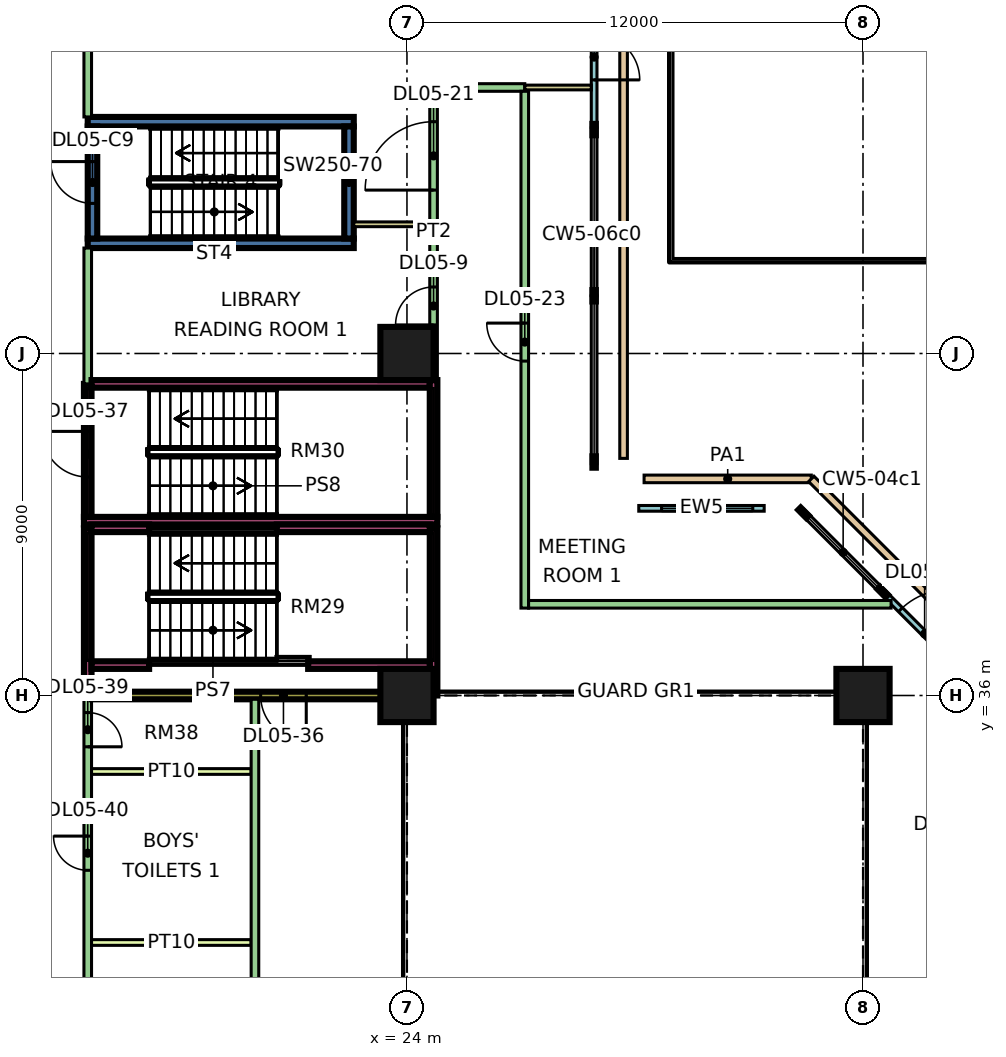
"""IFC4 building model, lengths in metres.
Left out: names, types, materials, properties, quantities, classifications, styles, units other than length and angle.
Written with IfcOpenShell. Run it as: python <this file> out.ifc"""

import sys

from ifc_helpers import new_model, si_unit, direction, frame, frame_2d, origin, origin_2d, place, context, subcontext, project, spatial, rectangle, extrude, element, fill, save


model = new_model("IFC4")
c1 = context("Model", 3, precision=1e-05, world=origin(), true_north=direction((0.0, 1.0)))
c2 = subcontext(c1, "Body", "Model", "MODEL_VIEW")
j1 = project(units=[si_unit("LENGTHUNIT", "METRE"), si_unit("PLANEANGLEUNIT", "RADIAN")], contexts=[c1])
p1 = place(None, origin())
s1 = spatial("IfcSite", under=j1, at=p1, CompositionType="ELEMENT")
p2 = place(p1, origin())
s2 = spatial("IfcBuilding", under=s1, at=p2, CompositionType="ELEMENT")
p3 = place(p2, frame((0.0, 0.0, 26.4)))
s3 = spatial("IfcBuildingStorey", under=s2, at=p3, CompositionType="ELEMENT", Elevation=26.4)
for number, where, z_axis, x_axis in (
    (1, (24.0, 36.0, 0.0), (0.0, 0.0, 1.0), (1.0, 0.0, 0.0)),
    (2, (36.0, 36.0, 0.0), (0.0, 0.0, 1.0), (1.0, 0.0, 0.0)),
    (3, (24.0, 45.0, 0.0), (0.0, 0.0, 1.0), (1.0, 0.0, 0.0)),
):
    element("IfcColumn", number, at=place(p3, frame(where, z_axis=z_axis, x_axis=x_axis)), inside=s3, PredefinedType="COLUMN", context=c2, shape_type="SweptSolid", body=[
        extrude(rectangle(XDim=1.4, YDim=1.4, at=origin_2d()), origin(), (0.0, 0.0, 1.0), 9.0),
    ])
for number, where, z_axis, x_axis in (
    (4, (15.6, 47.9, 0.0), (0.0, 0.0, 1.0), (1.0, 0.0, 0.0)),
    (5, (15.6, 51.1, 0.0), (0.0, 0.0, 1.0), (1.0, 0.0, 0.0)),
):
    element("IfcWall", number, at=place(p3, frame(where, z_axis=z_axis, x_axis=x_axis)), inside=s3, PredefinedType="SHEAR", context=c2, shape_type="SweptSolid", body=[
        extrude(rectangle(XDim=7.0, YDim=0.25, at=frame_2d((3.5, 0.0))), origin(), (0.0, 0.0, 1.0), 9.0),
    ])
p4 = place(p3, frame((15.725, 48.025, 0.0), z_axis=(0.0, 0.0, 1.0), x_axis=(0.0, 1.0, 0.0)))
e6 = element("IfcWall", 6, at=p4, inside=s3, PredefinedType="SHEAR", context=c2, shape_type="SweptSolid", body=[
    extrude(rectangle(XDim=2.95, YDim=0.25, at=frame_2d((1.475, 0.0))), origin(), (0.0, 0.0, 1.0), 9.0),
])
p5 = place(p4, frame((0.925, 0.0, 0.0)))
e7 = element("IfcOpeningElement", 7, at=p5, cuts=e6, PredefinedType="OPENING", context=c2, shape_type="SweptSolid", body=[
    extrude(rectangle(XDim=1.1, YDim=2.2, at=frame_2d((0.55, 1.1))), frame((0.0, 0.135, 0.0), z_axis=(0.0, -1.0, 0.0), x_axis=(1.0, 0.0, 0.0)), (0.0, 0.0, 1.0), 0.27),
])
p6 = place(p3, frame((22.475, 48.025, 0.0), z_axis=(0.0, 0.0, 1.0), x_axis=(0.0, 1.0, 0.0)))
e8 = element("IfcWall", 8, at=p6, inside=s3, PredefinedType="SHEAR", context=c2, shape_type="SweptSolid", body=[
    extrude(rectangle(XDim=2.95, YDim=0.25, at=frame_2d((1.475, 0.0))), origin(), (0.0, 0.0, 1.0), 9.0),
])
p7 = place(p3, frame((38.682, 36.561, 0.0), z_axis=(0.0, 0.0, 1.0), x_axis=(-0.707106781187, 0.707106781187, 0.0)))
e9 = element("IfcWall", 9, at=p7, inside=s3, PredefinedType="SOLIDWALL", context=c2, shape_type="SweptSolid", body=[
    extrude(rectangle(XDim=3.0, YDim=0.15, at=frame_2d((1.5, 0.0))), origin(), (0.0, 0.0, 1.0), 8.45),
])
p8 = place(p7, frame((0.6, 0.0, 0.0)))
e10 = element("IfcOpeningElement", 10, at=p8, cuts=e9, PredefinedType="OPENING", context=c2, shape_type="SweptSolid", body=[
    extrude(rectangle(XDim=1.8, YDim=2.4, at=frame_2d((0.9, 1.2))), frame((0.0, 0.085, 0.0), z_axis=(0.0, -1.0, 0.0), x_axis=(1.0, 0.0, 0.0)), (0.0, 0.0, 1.0), 0.17),
])
p9 = place(p3, frame((33.4, 40.925, 0.0), z_axis=(0.0, 0.0, 1.0), x_axis=(-1.0, 0.0, 0.0)))
e11 = element("IfcWall", 11, at=p9, inside=s3, PredefinedType="SOLIDWALL", context=c2, shape_type="SweptSolid", body=[
    extrude(rectangle(XDim=3.3, YDim=0.15, at=frame_2d((1.65, 0.0))), origin(), (0.0, 0.0, 1.0), 8.45),
])
p10 = place(p9, frame((0.3, 0.0, 0.9)))
e12 = element("IfcOpeningElement", 12, at=p10, cuts=e11, PredefinedType="OPENING", context=c2, shape_type="SweptSolid", body=[
    extrude(rectangle(XDim=2.4, YDim=2.7, at=frame_2d((1.2, 1.35))), frame((0.0, 0.085, 0.0), z_axis=(0.0, -1.0, 0.0), x_axis=(1.0, 0.0, 0.0)), (0.0, 0.0, 1.0), 0.17),
])
p11 = place(p3, frame((28.925, 50.95, 0.0), z_axis=(0.0, 0.0, 1.0), x_axis=(0.0, 1.0, 0.0)))
e13 = element("IfcWall", 13, at=p11, inside=s3, PredefinedType="SOLIDWALL", context=c2, shape_type="SweptSolid", body=[
    extrude(rectangle(XDim=3.0, YDim=0.15, at=frame_2d((1.5, 0.0))), origin(), (0.0, 0.0, 1.0), 8.45),
])
p12 = place(p11, frame((1.25, 0.0, 0.0)))
e14 = element("IfcOpeningElement", 14, at=p12, cuts=e13, PredefinedType="OPENING", context=c2, shape_type="SweptSolid", body=[
    extrude(rectangle(XDim=1.2, YDim=2.4, at=frame_2d((0.6, 1.2))), frame((0.0, 0.085, 0.0), z_axis=(0.0, -1.0, 0.0), x_axis=(1.0, 0.0, 0.0)), (0.0, 0.0, 1.0), 0.17),
])
p13 = place(p3, frame((29.7, 63.24, 0.0), z_axis=(0.0, 0.0, 1.0), x_axis=(0.0, -1.0, 0.0)))
e15 = element("IfcWall", 15, at=p13, inside=s3, PredefinedType="PARAPET", context=c2, shape_type="SweptSolid", body=[
    extrude(rectangle(XDim=21.0, YDim=0.2, at=frame_2d((10.5, 0.0))), origin(), (0.0, 0.0, 1.0), 0.5),
])
p14 = place(p3, frame((30.24, 41.7, 0.0), z_axis=(0.0, 0.0, 1.0), x_axis=(1.0, 0.0, 0.0)))
e16 = element("IfcWall", 16, at=p14, inside=s3, PredefinedType="PARAPET", context=c2, shape_type="SweptSolid", body=[
    extrude(rectangle(XDim=4.4, YDim=0.2, at=frame_2d((2.2, 0.0))), origin(), (0.0, 0.0, 1.0), 0.5),
])
p15 = place(p3, frame((34.64, 41.7, 0.0), z_axis=(0.0, 0.0, 1.0), x_axis=(0.707106781187, -0.707106781187, 0.0)))
e17 = element("IfcWall", 17, at=p15, inside=s3, PredefinedType="PARAPET", context=c2, shape_type="SweptSolid", body=[
    extrude(rectangle(XDim=9.985, YDim=0.2, at=frame_2d((4.992, 0.0))), origin(), (0.0, 0.0, 1.0), 0.5),
])
p16 = place(p3, frame((15.5, 40.6, 0.0), z_axis=(0.0, 0.0, 1.0), x_axis=(1.0, 0.0, 0.0)))
e18 = element("IfcWall", 18, at=p16, inside=s3, PredefinedType="SOLIDWALL", context=c2, shape_type="SweptSolid", body=[
    extrude(rectangle(XDim=9.3, YDim=0.2, at=frame_2d((4.65, 0.0))), origin(), (0.0, 0.0, 1.0), 8.45),
])
p17 = place(p3, frame((15.6, 23.9, 0.0), z_axis=(0.0, 0.0, 1.0), x_axis=(0.0, 1.0, 0.0)))
e19 = element("IfcWall", 19, at=p17, inside=s3, PredefinedType="PARTITIONING", context=c2, shape_type="SweptSolid", body=[
    extrude(rectangle(XDim=12.1, YDim=0.2, at=frame_2d((6.05, 0.0))), origin(), (0.0, 0.0, 1.0), 8.45),
])
p18 = place(p17, frame((10.75, 0.0, 0.0)))
e20 = element("IfcOpeningElement", 20, at=p18, cuts=e19, PredefinedType="OPENING", context=c2, shape_type="SweptSolid", body=[
    extrude(rectangle(XDim=0.9, YDim=2.1, at=frame_2d((0.45, 1.05))), frame((0.0, 0.11, 0.0), z_axis=(0.0, -1.0, 0.0), x_axis=(1.0, 0.0, 0.0)), (0.0, 0.0, 1.0), 0.22),
])
p19 = place(p17, frame((7.5, 0.0, 0.0)))
e21 = element("IfcOpeningElement", 21, at=p19, cuts=e19, PredefinedType="OPENING", context=c2, shape_type="SweptSolid", body=[
    extrude(rectangle(XDim=0.9, YDim=2.1, at=frame_2d((0.45, 1.05))), frame((0.0, 0.11, 0.0), z_axis=(0.0, -1.0, 0.0), x_axis=(1.0, 0.0, 0.0)), (0.0, 0.0, 1.0), 0.22),
])
p20 = place(p17, frame((2.5, 0.0, 0.0)))
e22 = element("IfcOpeningElement", 22, at=p20, cuts=e19, PredefinedType="OPENING", context=c2, shape_type="SweptSolid", body=[
    extrude(rectangle(XDim=0.9, YDim=2.1, at=frame_2d((0.45, 1.05))), frame((0.0, 0.11, 0.0), z_axis=(0.0, -1.0, 0.0), x_axis=(1.0, 0.0, 0.0)), (0.0, 0.0, 1.0), 0.22),
])
p21 = place(p3, frame((15.6, 36.0, 0.0), z_axis=(0.0, 0.0, 1.0), x_axis=(0.0, 1.0, 0.0)))
e23 = element("IfcWall", 23, at=p21, inside=s3, PredefinedType="SOLIDWALL", context=c2, shape_type="SweptSolid", body=[
    extrude(rectangle(XDim=4.4, YDim=0.2, at=frame_2d((2.2, 0.0))), origin(), (0.0, 0.0, 1.0), 8.45),
])
p22 = place(p3, frame((15.6, 40.7, 0.0), z_axis=(0.0, 0.0, 1.0), x_axis=(0.0, 1.0, 0.0)))
e24 = element("IfcWall", 24, at=p22, inside=s3, PredefinedType="SOLIDWALL", context=c2, shape_type="SweptSolid", body=[
    extrude(rectangle(XDim=3.5, YDim=0.2, at=frame_2d((1.75, 0.0))), origin(), (0.0, 0.0, 1.0), 8.45),
])
p23 = place(p22, frame((1.05, 0.0, 0.0)))
e25 = element("IfcOpeningElement", 25, at=p23, cuts=e24, PredefinedType="OPENING", context=c2, shape_type="SweptSolid", body=[
    extrude(rectangle(XDim=1.2, YDim=2.1, at=frame_2d((0.6, 1.05))), frame((0.0, 0.11, 0.0), z_axis=(0.0, -1.0, 0.0), x_axis=(1.0, 0.0, 0.0)), (0.0, 0.0, 1.0), 0.22),
])
p24 = place(p3, frame((15.6, 44.2, 0.0), z_axis=(0.0, 0.0, 1.0), x_axis=(0.0, 1.0, 0.0)))
e26 = element("IfcWall", 26, at=p24, inside=s3, PredefinedType="PARTITIONING", context=c2, shape_type="SweptSolid", body=[
    extrude(rectangle(XDim=3.575, YDim=0.2, at=frame_2d((1.788, 0.0))), origin(), (0.0, 0.0, 1.0), 8.45),
])
p25 = place(p3, frame((15.6, 51.225, 0.0), z_axis=(0.0, 0.0, 1.0), x_axis=(0.0, 1.0, 0.0)))
e27 = element("IfcWall", 27, at=p25, inside=s3, PredefinedType="PARTITIONING", context=c2, shape_type="SweptSolid", body=[
    extrude(rectangle(XDim=14.775, YDim=0.2, at=frame_2d((7.387, 0.0))), origin(), (0.0, 0.0, 1.0), 8.45),
])
p26 = place(p25, frame((5.675, 0.0, 0.0)))
e28 = element("IfcOpeningElement", 28, at=p26, cuts=e27, PredefinedType="OPENING", context=c2, shape_type="SweptSolid", body=[
    extrude(rectangle(XDim=1.8, YDim=2.1, at=frame_2d((0.9, 1.05))), frame((0.0, 0.11, 0.0), z_axis=(0.0, -1.0, 0.0), x_axis=(1.0, 0.0, 0.0)), (0.0, 0.0, 1.0), 0.22),
])
for number, where, z_axis, x_axis in (
    (29, (15.7, 29.5, 0.0), (0.0, 0.0, 1.0), (1.0, 0.0, 0.0)),
    (30, (15.7, 34.0, 0.0), (0.0, 0.0, 1.0), (1.0, 0.0, 0.0)),
):
    element("IfcWall", number, at=place(p3, frame(where, z_axis=z_axis, x_axis=x_axis)), inside=s3, PredefinedType="PARTITIONING", context=c2, shape_type="SweptSolid", body=[
        extrude(rectangle(XDim=4.2, YDim=0.15, at=frame_2d((2.1, 0.0))), origin(), (0.0, 0.0, 1.0), 8.45),
    ])
p27 = place(p3, frame((15.7, 36.0, 0.0), z_axis=(0.0, 0.0, 1.0), x_axis=(1.0, 0.0, 0.0)))
e31 = element("IfcWall", 31, at=p27, inside=s3, PredefinedType="SOLIDWALL", context=c2, shape_type="SweptSolid", body=[
    extrude(rectangle(XDim=8.3, YDim=0.2, at=frame_2d((4.15, 0.0))), origin(), (0.0, 0.0, 1.0), 6.55),
])
p28 = place(p27, frame((4.45, 0.0, 0.0)))
e32 = element("IfcOpeningElement", 32, at=p28, cuts=e31, PredefinedType="OPENING", context=c2, shape_type="SweptSolid", body=[
    extrude(rectangle(XDim=1.2, YDim=2.1, at=frame_2d((0.6, 1.05))), frame((0.0, 0.11, 0.0), z_axis=(0.0, -1.0, 0.0), x_axis=(1.0, 0.0, 0.0)), (0.0, 0.0, 1.0), 0.22),
])
p29 = place(p3, frame((15.7, 44.2, 0.0), z_axis=(0.0, 0.0, 1.0), x_axis=(1.0, 0.0, 0.0)))
e33 = element("IfcWall", 33, at=p29, inside=s3, PredefinedType="SOLIDWALL", context=c2, shape_type="SweptSolid", body=[
    extrude(rectangle(XDim=8.9, YDim=0.2, at=frame_2d((4.45, 0.0))), origin(), (0.0, 0.0, 1.0), 8.45),
])
p30 = place(p3, frame((20.0, 23.9, 0.0), z_axis=(0.0, 0.0, 1.0), x_axis=(0.0, 1.0, 0.0)))
e34 = element("IfcWall", 34, at=p30, inside=s3, PredefinedType="PARTITIONING", context=c2, shape_type="SweptSolid", body=[
    extrude(rectangle(XDim=12.0, YDim=0.2, at=frame_2d((6.0, 0.0))), origin(), (0.0, 0.0, 1.0), 8.45),
])
p31 = place(p3, frame((22.6, 48.4, 0.0), z_axis=(0.0, 0.0, 1.0), x_axis=(1.0, 0.0, 0.0)))
e35 = element("IfcWall", 35, at=p31, inside=s3, PredefinedType="PARTITIONING", context=c2, shape_type="SweptSolid", body=[
    extrude(rectangle(XDim=2.0, YDim=0.125, at=frame_2d((1.0, 0.0))), origin(), (0.0, 0.0, 1.0), 8.45),
])
p32 = place(p3, frame((24.7, 36.0, 0.0), z_axis=(0.0, 0.0, 1.0), x_axis=(0.0, 1.0, 0.0)))
e36 = element("IfcWall", 36, at=p32, inside=s3, PredefinedType="SOLIDWALL", context=c2, shape_type="SweptSolid", body=[
    extrude(rectangle(XDim=4.4, YDim=0.2, at=frame_2d((2.2, 0.0))), origin(), (0.0, 0.0, 1.0), 8.45),
])
p33 = place(p3, frame((24.7, 40.7, 0.0), z_axis=(0.0, 0.0, 1.0), x_axis=(0.0, 1.0, 0.0)))
e37 = element("IfcWall", 37, at=p33, inside=s3, PredefinedType="SOLIDWALL", context=c2, shape_type="SweptSolid", body=[
    extrude(rectangle(XDim=3.6, YDim=0.2, at=frame_2d((1.8, 0.0))), origin(), (0.0, 0.0, 1.0), 8.45),
])
p34 = place(p3, frame((24.7, 44.3, 0.0), z_axis=(0.0, 0.0, 1.0), x_axis=(0.0, 1.0, 0.0)))
e38 = element("IfcWall", 38, at=p34, inside=s3, PredefinedType="PARTITIONING", context=c2, shape_type="SweptSolid", body=[
    extrude(rectangle(XDim=7.8, YDim=0.2, at=frame_2d((3.9, 0.0))), origin(), (0.0, 0.0, 1.0), 8.45),
])
p35 = place(p34, frame((1.45, 0.0, 0.0)))
e39 = element("IfcOpeningElement", 39, at=p35, cuts=e38, PredefinedType="OPENING", context=c2, shape_type="SweptSolid", body=[
    extrude(rectangle(XDim=1.0, YDim=2.1, at=frame_2d((0.5, 1.05))), frame((0.0, 0.11, 0.0), z_axis=(0.0, -1.0, 0.0), x_axis=(1.0, 0.0, 0.0)), (0.0, 0.0, 1.0), 0.22),
])
p36 = place(p34, frame((5.0, 0.0, 0.0)))
e40 = element("IfcOpeningElement", 40, at=p36, cuts=e38, PredefinedType="OPENING", context=c2, shape_type="SweptSolid", body=[
    extrude(rectangle(XDim=1.8, YDim=2.1, at=frame_2d((0.9, 1.05))), frame((0.0, 0.11, 0.0), z_axis=(0.0, -1.0, 0.0), x_axis=(1.0, 0.0, 0.0)), (0.0, 0.0, 1.0), 0.22),
])
p37 = place(p3, frame((24.8, 52.0, 0.0), z_axis=(0.0, 0.0, 1.0), x_axis=(1.0, 0.0, 0.0)))
e41 = element("IfcWall", 41, at=p37, inside=s3, PredefinedType="PARTITIONING", context=c2, shape_type="SweptSolid", body=[
    extrude(rectangle(XDim=2.3, YDim=0.2, at=frame_2d((1.15, 0.0))), origin(), (0.0, 0.0, 1.0), 8.45),
])
p38 = place(p3, frame((27.1, 38.3, 0.0), z_axis=(0.0, 0.0, 1.0), x_axis=(0.0, 1.0, 0.0)))
e42 = element("IfcWall", 42, at=p38, inside=s3, PredefinedType="PARTITIONING", context=c2, shape_type="SweptSolid", body=[
    extrude(rectangle(XDim=13.6, YDim=0.2, at=frame_2d((6.8, 0.0))), origin(), (0.0, 0.0, 1.0), 8.45),
])
p39 = place(p38, frame((6.5, 0.0, 0.0)))
e43 = element("IfcOpeningElement", 43, at=p39, cuts=e42, PredefinedType="OPENING", context=c2, shape_type="SweptSolid", body=[
    extrude(rectangle(XDim=1.0, YDim=2.1, at=frame_2d((0.5, 1.05))), frame((0.0, 0.11, 0.0), z_axis=(0.0, -1.0, 0.0), x_axis=(1.0, 0.0, 0.0)), (0.0, 0.0, 1.0), 0.22),
])
p40 = place(p3, frame((27.1, 52.0, 0.0), z_axis=(0.0, 0.0, 1.0), x_axis=(1.0, 0.0, 0.0)))
e44 = element("IfcWall", 44, at=p40, inside=s3, PredefinedType="PARTITIONING", context=c2, shape_type="SweptSolid", body=[
    extrude(rectangle(XDim=1.751, YDim=0.125, at=frame_2d((0.875, 0.0))), origin(), (0.0, 0.0, 1.0), 8.45),
])
p41 = place(p3, frame((27.2, 38.4, 0.0), z_axis=(0.0, 0.0, 1.0), x_axis=(1.0, 0.0, 0.0)))
e45 = element("IfcWall", 45, at=p41, inside=s3, PredefinedType="PARTITIONING", context=c2, shape_type="SweptSolid", body=[
    extrude(rectangle(XDim=9.539, YDim=0.2, at=frame_2d((4.77, 0.0))), origin(), (0.0, 0.0, 1.0), 8.45),
])
p42 = place(p3, frame((21.4, 36.8, 0.0), z_axis=(0.0, 0.0, 1.0), x_axis=(1.0, 0.0, 0.0)))
e46 = element("IfcWall", 46, at=p42, inside=s3, PredefinedType="SOLIDWALL", context=c2, shape_type="SweptSolid", body=[
    extrude(rectangle(XDim=3.2, YDim=0.2, at=frame_2d((1.6, 0.0))), origin(), (0.0, 0.0, 1.0), 8.45),
])
p43 = place(p3, frame((20.575, 40.4, 0.0), z_axis=(0.0, 0.0, 1.0), x_axis=(1.0, 0.0, 0.0)))
e47 = element("IfcWall", 47, at=p43, inside=s3, PredefinedType="SOLIDWALL", context=c2, shape_type="SweptSolid", body=[
    extrude(rectangle(XDim=4.025, YDim=0.2, at=frame_2d((2.013, 0.0))), origin(), (0.0, 0.0, 1.0), 8.45),
])
for number, where, z_axis, x_axis in (
    (48, (15.7, 36.8, 0.0), (0.0, 0.0, 1.0), (1.0, 0.0, 0.0)),
    (49, (15.7, 40.4, 0.0), (0.0, 0.0, 1.0), (1.0, 0.0, 0.0)),
):
    element("IfcWall", number, at=place(p3, frame(where, z_axis=z_axis, x_axis=x_axis)), inside=s3, PredefinedType="SOLIDWALL", context=c2, shape_type="SweptSolid", body=[
        extrude(rectangle(XDim=1.515, YDim=0.2, at=frame_2d((0.758, 0.0))), origin(), (0.0, 0.0, 1.0), 8.45),
    ])
p44 = place(p8, frame((1.8, 0.0, 0.0), z_axis=(0.0, 0.0, 1.0), x_axis=(-1.0, 0.0, 0.0)))
e50 = element("IfcDoor", 50, at=p44, inside=s3, OperationType="DOUBLE_DOOR_SINGLE_SWING", PredefinedType="DOOR", context=c2, shape_type="SweptSolid", body=[
    extrude(rectangle(XDim=1.8, YDim=2.4, at=frame_2d((0.9, 1.2))), frame((0.0, 0.025, 0.0), z_axis=(0.0, -1.0, 0.0), x_axis=(1.0, 0.0, 0.0)), (0.0, 0.0, 1.0), 0.05),
])
fill(e10, e50)
p45 = place(p10, origin())
e51 = element("IfcWindow", 51, at=p45, inside=s3, PartitioningType="SINGLE_PANEL", PredefinedType="WINDOW", context=c2, shape_type="SweptSolid", body=[
    extrude(rectangle(XDim=2.4, YDim=2.7, at=frame_2d((1.2, 1.35))), frame((0.0, 0.03, 0.0), z_axis=(0.0, -1.0, 0.0), x_axis=(1.0, 0.0, 0.0)), (0.0, 0.0, 1.0), 0.06),
])
fill(e12, e51)
p46 = place(p12, frame((1.2, 0.0, 0.0), z_axis=(0.0, 0.0, 1.0), x_axis=(-1.0, 0.0, 0.0)))
e52 = element("IfcDoor", 52, at=p46, inside=s3, OperationType="DOUBLE_DOOR_SINGLE_SWING", PredefinedType="DOOR", context=c2, shape_type="SweptSolid", body=[
    extrude(rectangle(XDim=1.2, YDim=2.4, at=frame_2d((0.6, 1.2))), frame((0.0, 0.025, 0.0), z_axis=(0.0, -1.0, 0.0), x_axis=(1.0, 0.0, 0.0)), (0.0, 0.0, 1.0), 0.05),
])
fill(e14, e52)
p47 = place(p5, frame((1.1, 0.0, 0.0), z_axis=(0.0, 0.0, 1.0), x_axis=(-1.0, 0.0, 0.0)))
e53 = element("IfcDoor", 53, at=p47, inside=s3, OperationType="SINGLE_SWING_RIGHT", PredefinedType="DOOR", context=c2, shape_type="SweptSolid", body=[
    extrude(rectangle(XDim=1.1, YDim=2.2, at=frame_2d((0.55, 1.1))), frame((0.0, 0.025, 0.0), z_axis=(0.0, -1.0, 0.0), x_axis=(1.0, 0.0, 0.0)), (0.0, 0.0, 1.0), 0.05),
])
fill(e7, e53)
p48 = place(p35, origin())
e54 = element("IfcDoor", 54, at=p48, inside=s3, OperationType="SINGLE_SWING_LEFT", PredefinedType="DOOR", context=c2, shape_type="SweptSolid", body=[
    extrude(rectangle(XDim=1.0, YDim=2.1, at=frame_2d((0.5, 1.05))), frame((0.0, 0.025, 0.0), z_axis=(0.0, -1.0, 0.0), x_axis=(1.0, 0.0, 0.0)), (0.0, 0.0, 1.0), 0.05),
])
fill(e39, e54)
p49 = place(p36, origin())
e55 = element("IfcDoor", 55, at=p49, inside=s3, OperationType="DOUBLE_DOOR_SINGLE_SWING", PredefinedType="DOOR", context=c2, shape_type="SweptSolid", body=[
    extrude(rectangle(XDim=1.8, YDim=2.1, at=frame_2d((0.9, 1.05))), frame((0.0, 0.025, 0.0), z_axis=(0.0, -1.0, 0.0), x_axis=(1.0, 0.0, 0.0)), (0.0, 0.0, 1.0), 0.05),
])
fill(e40, e55)
p50 = place(p39, frame((1.0, 0.0, 0.0), z_axis=(0.0, 0.0, 1.0), x_axis=(-1.0, 0.0, 0.0)))
e56 = element("IfcDoor", 56, at=p50, inside=s3, OperationType="SINGLE_SWING_RIGHT", PredefinedType="DOOR", context=c2, shape_type="SweptSolid", body=[
    extrude(rectangle(XDim=1.0, YDim=2.1, at=frame_2d((0.5, 1.05))), frame((0.0, 0.025, 0.0), z_axis=(0.0, -1.0, 0.0), x_axis=(1.0, 0.0, 0.0)), (0.0, 0.0, 1.0), 0.05),
])
fill(e43, e56)
p51 = place(p28, origin())
e57 = element("IfcDoor", 57, at=p51, inside=s3, OperationType="SINGLE_SWING_RIGHT", PredefinedType="DOOR", context=c2, shape_type="SweptSolid", body=[
    extrude(rectangle(XDim=1.2, YDim=2.1, at=frame_2d((0.6, 1.05))), frame((0.0, 0.025, 0.0), z_axis=(0.0, -1.0, 0.0), x_axis=(1.0, 0.0, 0.0)), (0.0, 0.0, 1.0), 0.05),
])
fill(e32, e57)
p52 = place(p23, frame((1.2, 0.0, 0.0), z_axis=(0.0, 0.0, 1.0), x_axis=(-1.0, 0.0, 0.0)))
e58 = element("IfcDoor", 58, at=p52, inside=s3, OperationType="SINGLE_SWING_RIGHT", PredefinedType="DOOR", context=c2, shape_type="SweptSolid", body=[
    extrude(rectangle(XDim=1.2, YDim=2.1, at=frame_2d((0.6, 1.05))), frame((0.0, 0.025, 0.0), z_axis=(0.0, -1.0, 0.0), x_axis=(1.0, 0.0, 0.0)), (0.0, 0.0, 1.0), 0.05),
])
fill(e25, e58)
p53 = place(p18, frame((0.9, 0.0, 0.0), z_axis=(0.0, 0.0, 1.0), x_axis=(-1.0, 0.0, 0.0)))
e59 = element("IfcDoor", 59, at=p53, inside=s3, OperationType="SINGLE_SWING_LEFT", PredefinedType="DOOR", context=c2, shape_type="SweptSolid", body=[
    extrude(rectangle(XDim=0.9, YDim=2.1, at=frame_2d((0.45, 1.05))), frame((0.0, 0.025, 0.0), z_axis=(0.0, -1.0, 0.0), x_axis=(1.0, 0.0, 0.0)), (0.0, 0.0, 1.0), 0.05),
])
fill(e20, e59)
p54 = place(p19, frame((0.9, 0.0, 0.0), z_axis=(0.0, 0.0, 1.0), x_axis=(-1.0, 0.0, 0.0)))
e60 = element("IfcDoor", 60, at=p54, inside=s3, OperationType="SINGLE_SWING_RIGHT", PredefinedType="DOOR", context=c2, shape_type="SweptSolid", body=[
    extrude(rectangle(XDim=0.9, YDim=2.1, at=frame_2d((0.45, 1.05))), frame((0.0, 0.025, 0.0), z_axis=(0.0, -1.0, 0.0), x_axis=(1.0, 0.0, 0.0)), (0.0, 0.0, 1.0), 0.05),
])
fill(e21, e60)
save(model, sys.argv[1])
